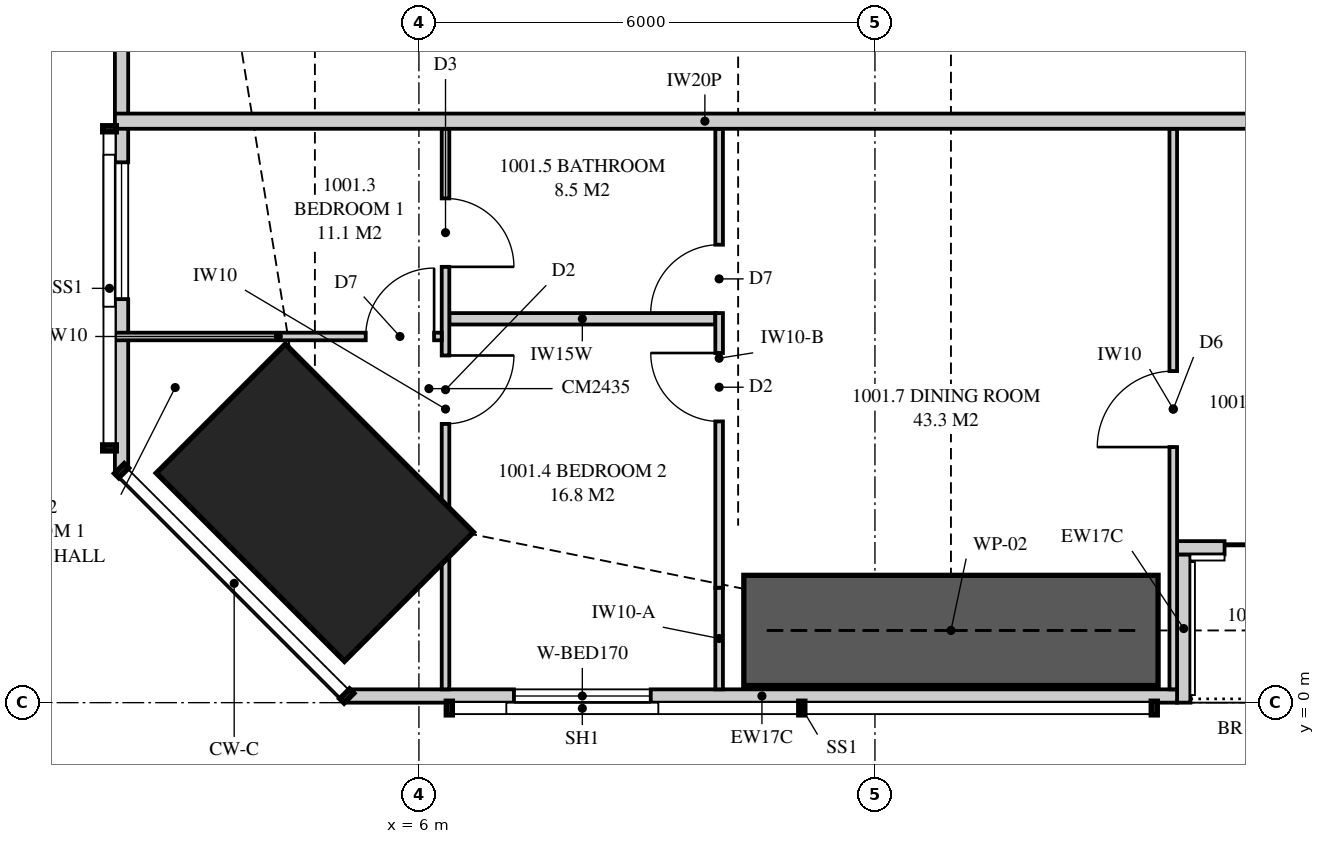
"""IFC4 building model, lengths in metres.
Left out: names, types, materials, properties, quantities, classifications, styles, units other than length and angle.
Written with IfcOpenShell. Run it as: python <this file> out.ifc"""

import sys

from ifc_helpers import new_model, si_unit, direction, frame, frame_2d, origin, origin_2d, place, context, subcontext, project, spatial, polyline, rectangle, outline, extrude, element, fill, save


model = new_model("IFC4")
c1 = context("Model", 3, precision=1e-05, world=origin(), true_north=direction((0.0, 1.0)))
c2 = subcontext(c1, "Body", "Model", "MODEL_VIEW")
j1 = project(units=[si_unit("LENGTHUNIT", "METRE"), si_unit("PLANEANGLEUNIT", "RADIAN")], contexts=[c1])
p1 = place(None, origin())
s1 = spatial("IfcSite", under=j1, at=p1, CompositionType="ELEMENT")
p2 = place(p1, origin())
s2 = spatial("IfcBuilding", under=s1, at=p2, CompositionType="ELEMENT")
p3 = place(p2, frame((0.0, 0.0, 41.1)))
s3 = spatial("IfcBuildingStorey", under=s2, at=p3, CompositionType="ELEMENT", Elevation=41.1)
p4 = place(p3, frame((4.631, 2.631, 0.0), z_axis=(0.0, 0.0, 1.0), x_axis=(0.707106781187, 0.707106781187, 0.0)))
e1 = element("IfcColumn", 1, at=p4, inside=s3, PredefinedType="COLUMN", context=c2, shape_type="SweptSolid", body=[
    extrude(rectangle(XDim=2.4, YDim=3.5, at=origin_2d()), origin(), (0.0, 0.0, 1.0), 3.35),
])
p5 = place(p3, frame((5.051, 0.087, 0.0), z_axis=(0.0, 0.0, 1.0), x_axis=(1.0, 0.0, 0.0)))
e2 = element("IfcWall", 2, at=p5, inside=s3, PredefinedType="SOLIDWALL", context=c2, shape_type="SweptSolid", body=[
    extrude(outline(polyline([(0.0, 0.0), (10.924, 0.0), (10.924, 2.15), (7.949, 2.15), (7.949, 3.11), (7.793, 3.11), (7.793, 2.15), (7.745, 2.15), (7.745, 3.11), (0.0, 3.11), (0.0, 0.0)])), frame((0.0, 0.087, 0.0), z_axis=(0.0, -1.0, 0.0), x_axis=(1.0, 0.0, 0.0)), (0.0, 0.0, 1.0), 0.175),
])
p6 = place(p5, frame((2.199, 0.0, 0.4)))
e3 = element("IfcOpeningElement", 3, at=p6, cuts=e2, PredefinedType="OPENING", context=c2, shape_type="SweptSolid", body=[
    extrude(rectangle(XDim=1.8, YDim=1.7, at=frame_2d((0.9, 0.85))), frame((0.0, 0.097, 0.0), z_axis=(0.0, -1.0, 0.0), x_axis=(1.0, 0.0, 0.0)), (0.0, 0.0, 1.0), 0.195),
])
p7 = place(p3, frame((15.975, 2.038, 0.0), z_axis=(0.0, 0.0, 1.0), x_axis=(1.0, 0.0, 0.0)))
e4 = element("IfcWall", 4, at=p7, inside=s3, PredefinedType="SOLIDWALL", context=c2, shape_type="SweptSolid", body=[
    extrude(rectangle(XDim=3.05, YDim=0.175, at=frame_2d((1.525, 0.0))), origin(), (0.0, 0.0, 1.0), 3.11),
])
p8 = place(p7, frame((0.625, 0.0, 0.0)))
e5 = element("IfcOpeningElement", 5, at=p8, cuts=e4, PredefinedType="OPENING", context=c2, shape_type="SweptSolid", body=[
    extrude(rectangle(XDim=1.8, YDim=2.1, at=frame_2d((0.9, 1.05))), frame((0.0, 0.097, 0.0), z_axis=(0.0, -1.0, 0.0), x_axis=(1.0, 0.0, 0.0)), (0.0, 0.0, 1.0), 0.195),
])
p9 = place(p3, frame((16.062, 0.0, 0.0), z_axis=(0.0, 0.0, 1.0), x_axis=(0.0, 1.0, 0.0)))
e6 = element("IfcWall", 6, at=p9, inside=s3, PredefinedType="SOLIDWALL", context=c2, shape_type="SweptSolid", body=[
    extrude(outline(polyline([(0.0, 0.0), (1.95, 0.0), (1.95, 3.11), (1.75, 3.11), (1.75, 2.15), (0.15, 2.15), (0.15, 3.11), (0.0, 3.11), (0.0, 0.0)])), frame((0.0, 0.087, 0.0), z_axis=(0.0, -1.0, 0.0), x_axis=(1.0, 0.0, 0.0)), (0.0, 0.0, 1.0), 0.175),
])
p10 = place(p3, frame((2.087, 15.8, 0.0), z_axis=(0.0, 0.0, 1.0), x_axis=(0.0, -1.0, 0.0)))
e7 = element("IfcWall", 7, at=p10, inside=s3, PredefinedType="SOLIDWALL", context=c2, shape_type="SweptSolid", body=[
    extrude(outline(polyline([(0.0, 0.0), (12.749, 0.0), (12.749, 3.11), (3.019, 3.11), (3.019, 2.15), (2.926, 2.15), (2.926, 3.11), (2.8, 3.11), (2.8, 2.15), (0.0, 2.15), (0.0, 0.0)])), frame((0.0, 0.087, 0.0), z_axis=(0.0, -1.0, 0.0), x_axis=(1.0, 0.0, 0.0)), (0.0, 0.0, 1.0), 0.175),
])
p11 = place(p10, frame((5.65, 0.0, 0.4)))
e8 = element("IfcOpeningElement", 8, at=p11, cuts=e7, PredefinedType="OPENING", context=c2, shape_type="SweptSolid", body=[
    extrude(rectangle(XDim=1.2, YDim=1.7, at=frame_2d((0.6, 0.85))), frame((0.0, 0.097, 0.0), z_axis=(0.0, -1.0, 0.0), x_axis=(1.0, 0.0, 0.0)), (0.0, 0.0, 1.0), 0.195),
])
p12 = place(p10, frame((8.691, 0.0, 0.4)))
e9 = element("IfcOpeningElement", 9, at=p12, cuts=e7, PredefinedType="OPENING", context=c2, shape_type="SweptSolid", body=[
    extrude(rectangle(XDim=1.8, YDim=1.7, at=frame_2d((0.9, 0.85))), frame((0.0, 0.097, 0.0), z_axis=(0.0, -1.0, 0.0), x_axis=(1.0, 0.0, 0.0)), (0.0, 0.0, 1.0), 0.195),
])
p13 = place(p3, frame((6.35, 0.175, 0.0), z_axis=(0.0, 0.0, 1.0), x_axis=(0.0, 1.0, 0.0)))
e10 = element("IfcWall", 10, at=p13, inside=s3, PredefinedType="PARTITIONING", context=c2, shape_type="SweptSolid", body=[
    extrude(outline(polyline([(0.0, 0.0), (7.375, 0.0), (7.375, 3.11), (2.988, 3.11), (2.988, 2.15), (1.234, 2.15), (1.234, 3.11), (0.0, 3.11), (0.0, 0.0)])), frame((0.0, 0.05, 0.0), z_axis=(0.0, -1.0, 0.0), x_axis=(1.0, 0.0, 0.0)), (0.0, 0.0, 1.0), 0.1),
])
p14 = place(p13, frame((3.492, 0.0, 0.0)))
e11 = element("IfcOpeningElement", 11, at=p14, cuts=e10, PredefinedType="OPENING", context=c2, shape_type="SweptSolid", body=[
    extrude(rectangle(XDim=0.9, YDim=2.1, at=frame_2d((0.45, 1.05))), frame((0.0, 0.06, 0.0), z_axis=(0.0, -1.0, 0.0), x_axis=(1.0, 0.0, 0.0)), (0.0, 0.0, 1.0), 0.12),
])
p15 = place(p13, frame((5.559, 0.0, 0.0)))
e12 = element("IfcOpeningElement", 12, at=p15, cuts=e10, PredefinedType="OPENING", context=c2, shape_type="SweptSolid", body=[
    extrude(rectangle(XDim=0.9, YDim=2.1, at=frame_2d((0.45, 1.05))), frame((0.0, 0.06, 0.0), z_axis=(0.0, -1.0, 0.0), x_axis=(1.0, 0.0, 0.0)), (0.0, 0.0, 1.0), 0.12),
])
p16 = place(p3, frame((9.95, 0.175, 0.0), z_axis=(0.0, 0.0, 1.0), x_axis=(0.0, 1.0, 0.0)))
e13 = element("IfcWall", 13, at=p16, inside=s3, PredefinedType="PARTITIONING", context=c2, shape_type="SweptSolid", body=[
    extrude(outline(polyline([(0.0, 0.0), (1.338, 0.0), (1.338, 2.15), (0.51, 2.15), (0.51, 3.11), (0.0, 3.11), (0.0, 0.0)])), frame((0.0, 0.05, 0.0), z_axis=(0.0, -1.0, 0.0), x_axis=(1.0, 0.0, 0.0)), (0.0, 0.0, 1.0), 0.1),
])
p17 = place(p3, frame((9.95, 1.513, 0.0), z_axis=(0.0, 0.0, 1.0), x_axis=(0.0, 1.0, 0.0)))
e14 = element("IfcWall", 14, at=p17, inside=s3, PredefinedType="PARTITIONING", context=c2, shape_type="SweptSolid", body=[
    extrude(outline(polyline([(0.0, 0.0), (6.037, 0.0), (6.037, 2.51), (0.927, 2.51), (0.927, 2.15), (0.0, 2.15), (0.0, 0.0)])), frame((0.0, 0.05, 0.0), z_axis=(0.0, -1.0, 0.0), x_axis=(1.0, 0.0, 0.0)), (0.0, 0.0, 1.0), 0.1),
])
p18 = place(p17, frame((2.188, 0.0, 0.0)))
e15 = element("IfcOpeningElement", 15, at=p18, cuts=e14, PredefinedType="OPENING", context=c2, shape_type="SweptSolid", body=[
    extrude(rectangle(XDim=0.9, YDim=2.1, at=frame_2d((0.45, 1.05))), frame((0.0, 0.06, 0.0), z_axis=(0.0, -1.0, 0.0), x_axis=(1.0, 0.0, 0.0)), (0.0, 0.0, 1.0), 0.12),
])
p19 = place(p17, frame((3.612, 0.0, 0.0)))
e16 = element("IfcOpeningElement", 16, at=p19, cuts=e14, PredefinedType="OPENING", context=c2, shape_type="SweptSolid", body=[
    extrude(rectangle(XDim=0.9, YDim=2.1, at=frame_2d((0.45, 1.05))), frame((0.0, 0.06, 0.0), z_axis=(0.0, -1.0, 0.0), x_axis=(1.0, 0.0, 0.0)), (0.0, 0.0, 1.0), 0.12),
])
p20 = place(p3, frame((2.0, 4.817, 0.0), z_axis=(0.0, 0.0, 1.0), x_axis=(1.0, 0.0, 0.0)))
e17 = element("IfcWall", 17, at=p20, inside=s3, PredefinedType="PARTITIONING", context=c2, shape_type="SweptSolid", body=[
    extrude(outline(polyline([(0.0, 0.0), (4.3, 0.0), (4.3, 3.11), (3.148, 3.11), (3.148, 2.15), (1.406, 2.15), (1.406, 3.11), (0.0, 3.11), (0.0, 0.0)])), frame((0.0, 0.05, 0.0), z_axis=(0.0, -1.0, 0.0), x_axis=(1.0, 0.0, 0.0)), (0.0, 0.0, 1.0), 0.1),
])
p21 = place(p20, frame((3.3, 0.0, 0.0)))
e18 = element("IfcOpeningElement", 18, at=p21, cuts=e17, PredefinedType="OPENING", context=c2, shape_type="SweptSolid", body=[
    extrude(rectangle(XDim=0.9, YDim=2.1, at=frame_2d((0.45, 1.05))), frame((0.0, 0.06, 0.0), z_axis=(0.0, -1.0, 0.0), x_axis=(1.0, 0.0, 0.0)), (0.0, 0.0, 1.0), 0.12),
])
p22 = place(p3, frame((6.4, 5.05, 0.0), z_axis=(0.0, 0.0, 1.0), x_axis=(1.0, 0.0, 0.0)))
e19 = element("IfcWall", 19, at=p22, inside=s3, PredefinedType="PLUMBINGWALL", context=c2, shape_type="SweptSolid", body=[
    extrude(outline(polyline([(0.0, 0.0), (3.5, 0.0), (3.5, 3.11), (3.5, 2.51), (2.515, 2.51), (2.515, 3.11), (0.0, 3.11), (0.0, 0.0)])), frame((0.0, 0.075, 0.0), z_axis=(0.0, -1.0, 0.0), x_axis=(1.0, 0.0, 0.0)), (0.0, 0.0, 1.0), 0.15),
])
p23 = place(p3, frame((15.925, 0.175, 0.0), z_axis=(0.0, 0.0, 1.0), x_axis=(0.0, 1.0, 0.0)))
e20 = element("IfcWall", 20, at=p23, inside=s3, PredefinedType="PARTITIONING", context=c2, shape_type="SweptSolid", body=[
    extrude(outline(polyline([(0.0, 0.0), (7.375, 0.0), (7.375, 3.11), (1.635, 3.11), (1.635, 2.15), (0.0, 2.15), (0.0, 3.11), (0.0, 0.0)])), frame((0.0, 0.05, 0.0), z_axis=(0.0, -1.0, 0.0), x_axis=(1.0, 0.0, 0.0)), (0.0, 0.0, 1.0), 0.1),
])
p24 = place(p23, frame((3.188, 0.0, 0.0)))
e21 = element("IfcOpeningElement", 21, at=p24, cuts=e20, PredefinedType="OPENING", context=c2, shape_type="SweptSolid", body=[
    extrude(rectangle(XDim=1.0, YDim=2.1, at=frame_2d((0.5, 1.05))), frame((0.0, 0.06, 0.0), z_axis=(0.0, -1.0, 0.0), x_axis=(1.0, 0.0, 0.0)), (0.0, 0.0, 1.0), 0.12),
])
p25 = place(p3, frame((2.0, 7.65, 0.0), z_axis=(0.0, 0.0, 1.0), x_axis=(1.0, 0.0, 0.0)))
e22 = element("IfcWall", 22, at=p25, inside=s3, PredefinedType="PARTITIONING", context=c2, shape_type="SweptSolid", body=[
    extrude(outline(polyline([(0.0, 0.0), (15.525, 0.0), (15.525, 3.11), (11.337, 3.11), (11.337, 2.541), (10.663, 2.541), (10.663, 3.11), (9.51, 3.11), (9.51, 2.51), (6.89, 2.51), (6.89, 3.11), (2.969, 3.11), (2.969, 2.541), (2.74, 2.541), (2.74, 2.15), (0.896, 2.15), (0.896, 3.11), (0.0, 3.11), (0.0, 0.0)])), frame((0.0, 0.1, 0.0), z_axis=(0.0, -1.0, 0.0), x_axis=(1.0, 0.0, 0.0)), (0.0, 0.0, 1.0), 0.2),
])
p26 = place(p3, frame((10.275, 0.95, 0.0), z_axis=(0.0, 0.0, 1.0), x_axis=(1.0, 0.0, 0.0)))
e23 = element("IfcWall", 23, at=p26, inside=s3, PredefinedType="SHEAR", context=c2, shape_type="SweptSolid", body=[
    extrude(rectangle(XDim=5.45, YDim=1.45, at=frame_2d((2.725, 0.0))), origin(), (0.0, 0.0, 1.0), 3.35),
])
p27 = place(p6, origin())
e24 = element("IfcWindow", 24, at=p27, inside=s3, PartitioningType="SINGLE_PANEL", PredefinedType="WINDOW", context=c2, shape_type="SweptSolid", body=[
    extrude(rectangle(XDim=1.8, YDim=1.7, at=frame_2d((0.9, 0.85))), frame((0.0, 0.03, 0.0), z_axis=(0.0, -1.0, 0.0), x_axis=(1.0, 0.0, 0.0)), (0.0, 0.0, 1.0), 0.06),
])
fill(e3, e24)
p28 = place(p8, origin())
e25 = element("IfcDoor", 25, at=p28, inside=s3, OperationType="SLIDING_TO_LEFT", PredefinedType="DOOR", context=c2, shape_type="SweptSolid", body=[
    extrude(rectangle(XDim=1.8, YDim=2.1, at=frame_2d((0.9, 1.05))), frame((0.0, 0.025, 0.0), z_axis=(0.0, -1.0, 0.0), x_axis=(1.0, 0.0, 0.0)), (0.0, 0.0, 1.0), 0.05),
])
fill(e5, e25)
p29 = place(p12, origin())
e26 = element("IfcWindow", 26, at=p29, inside=s3, PartitioningType="SINGLE_PANEL", PredefinedType="WINDOW", context=c2, shape_type="SweptSolid", body=[
    extrude(rectangle(XDim=1.8, YDim=1.7, at=frame_2d((0.9, 0.85))), frame((0.0, 0.03, 0.0), z_axis=(0.0, -1.0, 0.0), x_axis=(1.0, 0.0, 0.0)), (0.0, 0.0, 1.0), 0.06),
])
fill(e9, e26)
p30 = place(p21, origin())
e27 = element("IfcDoor", 27, at=p30, inside=s3, OperationType="SINGLE_SWING_RIGHT", PredefinedType="DOOR", context=c2, shape_type="SweptSolid", body=[
    extrude(rectangle(XDim=0.9, YDim=2.1, at=frame_2d((0.45, 1.05))), frame((0.0, 0.025, 0.0), z_axis=(0.0, -1.0, 0.0), x_axis=(1.0, 0.0, 0.0)), (0.0, 0.0, 1.0), 0.05),
])
fill(e18, e27)
p31 = place(p14, frame((0.9, 0.0, 0.0), z_axis=(0.0, 0.0, 1.0), x_axis=(-1.0, 0.0, 0.0)))
e28 = element("IfcDoor", 28, at=p31, inside=s3, OperationType="SINGLE_SWING_LEFT", PredefinedType="DOOR", context=c2, shape_type="SweptSolid", body=[
    extrude(rectangle(XDim=0.9, YDim=2.1, at=frame_2d((0.45, 1.05))), frame((0.0, 0.025, 0.0), z_axis=(0.0, -1.0, 0.0), x_axis=(1.0, 0.0, 0.0)), (0.0, 0.0, 1.0), 0.05),
])
fill(e11, e28)
p32 = place(p18, origin())
e29 = element("IfcDoor", 29, at=p32, inside=s3, OperationType="SINGLE_SWING_RIGHT", PredefinedType="DOOR", context=c2, shape_type="SweptSolid", body=[
    extrude(rectangle(XDim=0.9, YDim=2.1, at=frame_2d((0.45, 1.05))), frame((0.0, 0.025, 0.0), z_axis=(0.0, -1.0, 0.0), x_axis=(1.0, 0.0, 0.0)), (0.0, 0.0, 1.0), 0.05),
])
fill(e15, e29)
p33 = place(p19, origin())
e30 = element("IfcDoor", 30, at=p33, inside=s3, OperationType="SINGLE_SWING_LEFT", PredefinedType="DOOR", context=c2, shape_type="SweptSolid", body=[
    extrude(rectangle(XDim=0.9, YDim=2.1, at=frame_2d((0.45, 1.05))), frame((0.0, 0.025, 0.0), z_axis=(0.0, -1.0, 0.0), x_axis=(1.0, 0.0, 0.0)), (0.0, 0.0, 1.0), 0.05),
])
fill(e16, e30)
p34 = place(p15, frame((0.9, 0.0, 0.0), z_axis=(0.0, 0.0, 1.0), x_axis=(-1.0, 0.0, 0.0)))
e31 = element("IfcDoor", 31, at=p34, inside=s3, OperationType="SINGLE_SWING_RIGHT", PredefinedType="DOOR", context=c2, shape_type="SweptSolid", body=[
    extrude(rectangle(XDim=0.9, YDim=2.1, at=frame_2d((0.45, 1.05))), frame((0.0, 0.025, 0.0), z_axis=(0.0, -1.0, 0.0), x_axis=(1.0, 0.0, 0.0)), (0.0, 0.0, 1.0), 0.05),
])
fill(e12, e31)
p35 = place(p24, origin())
e32 = element("IfcDoor", 32, at=p35, inside=s3, OperationType="SINGLE_SWING_LEFT", PredefinedType="DOOR", context=c2, shape_type="SweptSolid", body=[
    extrude(rectangle(XDim=1.0, YDim=2.1, at=frame_2d((0.5, 1.05))), frame((0.0, 0.025, 0.0), z_axis=(0.0, -1.0, 0.0), x_axis=(1.0, 0.0, 0.0)), (0.0, 0.0, 1.0), 0.05),
])
fill(e21, e32)
save(model, sys.argv[1])
